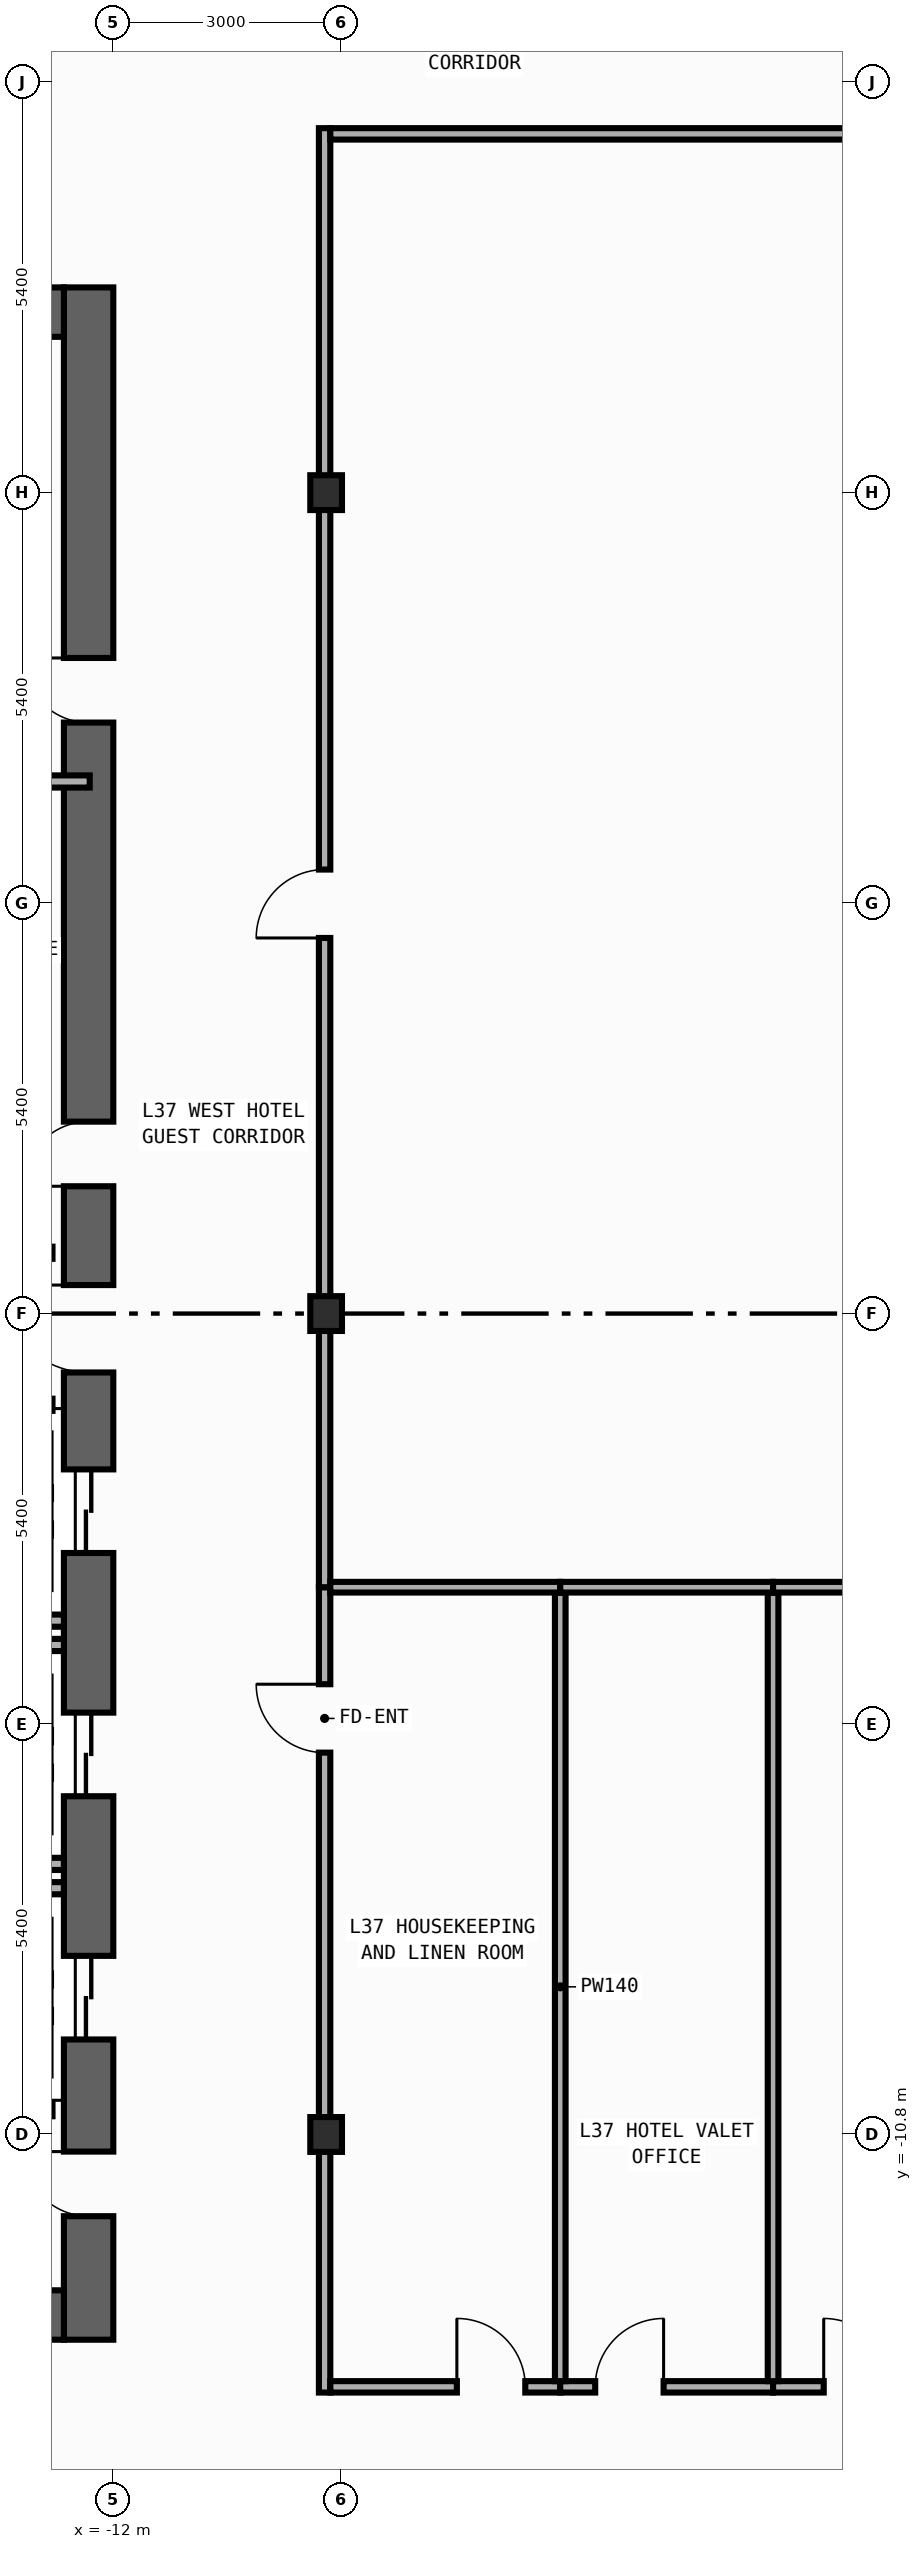
"""IFC4 building model, lengths in metres.
Left out: names, types, materials, properties, quantities, classifications, styles, units other than length and angle.
Written with IfcOpenShell. Run it as: python <this file> out.ifc"""

import sys

from ifc_helpers import new_model, si_unit, direction, frame, frame_2d, origin, origin_2d, place, context, subcontext, project, spatial, rectangle, i_section, extrude, element, fill, save


model = new_model("IFC4")
c1 = context("Model", 3, precision=1e-05, world=origin(), true_north=direction((0.0, 1.0)))
c2 = subcontext(c1, "Body", "Model", "MODEL_VIEW")
j1 = project(units=[si_unit("LENGTHUNIT", "METRE"), si_unit("PLANEANGLEUNIT", "RADIAN")], contexts=[c1])
p1 = place(None, origin())
s1 = spatial("IfcSite", under=j1, at=p1, CompositionType="ELEMENT")
p2 = place(p1, origin())
s2 = spatial("IfcBuilding", under=s1, at=p2, CompositionType="ELEMENT")
p3 = place(p2, frame((0.0, 0.0, 165.0)))
s3 = spatial("IfcBuildingStorey", under=s2, at=p3, CompositionType="ELEMENT", Elevation=165.0)
p4 = place(p3, frame((-12.325, -13.5, 0.0), z_axis=(0.0, 0.0, 1.0), x_axis=(0.0, 1.0, 0.0)))
e1 = element("IfcWall", 1, at=p4, inside=s3, PredefinedType="SHEAR", context=c2, shape_type="SweptSolid", body=[
    extrude(rectangle(XDim=27.0, YDim=0.65, at=frame_2d((13.5, 0.0))), origin(), (0.0, 0.0, 1.0), 3.54),
])
p5 = place(p4, frame((10.35, 0.0, 0.0)))
e2 = element("IfcOpeningElement", 2, at=p5, cuts=e1, PredefinedType="OPENING", context=c2, shape_type="SweptSolid", body=[
    extrude(rectangle(XDim=1.1, YDim=2.2, at=frame_2d((0.55, 1.1))), frame((0.0, 0.335, 0.0), z_axis=(0.0, -1.0, 0.0), x_axis=(1.0, 0.0, 0.0)), (0.0, 0.0, 1.0), 0.67),
])
p6 = place(p4, frame((7.15, 0.0, 0.0)))
e3 = element("IfcOpeningElement", 3, at=p6, cuts=e1, PredefinedType="OPENING", context=c2, shape_type="SweptSolid", body=[
    extrude(rectangle(XDim=1.1, YDim=2.2, at=frame_2d((0.55, 1.1))), frame((0.0, 0.335, 0.0), z_axis=(0.0, -1.0, 0.0), x_axis=(1.0, 0.0, 0.0)), (0.0, 0.0, 1.0), 0.67),
])
p7 = place(p4, frame((3.95, 0.0, 0.0)))
e4 = element("IfcOpeningElement", 4, at=p7, cuts=e1, PredefinedType="OPENING", context=c2, shape_type="SweptSolid", body=[
    extrude(rectangle(XDim=1.1, YDim=2.2, at=frame_2d((0.55, 1.1))), frame((0.0, 0.335, 0.0), z_axis=(0.0, -1.0, 0.0), x_axis=(1.0, 0.0, 0.0)), (0.0, 0.0, 1.0), 0.67),
])
p8 = place(p4, frame((15.175, 0.0, 0.0)))
e5 = element("IfcOpeningElement", 5, at=p8, cuts=e1, PredefinedType="OPENING", context=c2, shape_type="SweptSolid", body=[
    extrude(rectangle(XDim=0.85, YDim=2.1, at=frame_2d((0.425, 1.05))), frame((0.0, 0.335, 0.0), z_axis=(0.0, -1.0, 0.0), x_axis=(1.0, 0.0, 0.0)), (0.0, 0.0, 1.0), 0.67),
])
p9 = place(p4, frame((21.275, 0.0, 0.0)))
e6 = element("IfcOpeningElement", 6, at=p9, cuts=e1, PredefinedType="OPENING", context=c2, shape_type="SweptSolid", body=[
    extrude(rectangle(XDim=0.85, YDim=2.1, at=frame_2d((0.425, 1.05))), frame((0.0, 0.335, 0.0), z_axis=(0.0, -1.0, 0.0), x_axis=(1.0, 0.0, 0.0)), (0.0, 0.0, 1.0), 0.67),
])
p10 = place(p4, frame((12.725, 0.0, 0.0)))
e7 = element("IfcOpeningElement", 7, at=p10, cuts=e1, PredefinedType="OPENING", context=c2, shape_type="SweptSolid", body=[
    extrude(rectangle(XDim=1.15, YDim=2.2, at=frame_2d((0.575, 1.1))), frame((0.0, 0.335, 0.0), z_axis=(0.0, -1.0, 0.0), x_axis=(1.0, 0.0, 0.0)), (0.0, 0.0, 1.0), 0.67),
])
p11 = place(p4, frame((1.625, 0.0, 0.0)))
e8 = element("IfcOpeningElement", 8, at=p11, cuts=e1, PredefinedType="OPENING", context=c2, shape_type="SweptSolid", body=[
    extrude(rectangle(XDim=0.85, YDim=2.1, at=frame_2d((0.425, 1.05))), frame((0.0, 0.335, 0.0), z_axis=(0.0, -1.0, 0.0), x_axis=(1.0, 0.0, 0.0)), (0.0, 0.0, 1.0), 0.67),
])
for number, where, z_axis, x_axis in (
    (9, (-19.75, -13.175, 0.0), (0.0, 0.0, 1.0), (1.0, 0.0, 0.0)),
    (10, (-19.75, 13.175, 0.0), (0.0, 0.0, 1.0), (1.0, 0.0, 0.0)),
):
    element("IfcWall", number, at=place(p3, frame(where, z_axis=z_axis, x_axis=x_axis)), inside=s3, PredefinedType="SHEAR", context=c2, shape_type="SweptSolid", body=[
        extrude(rectangle(XDim=7.1, YDim=0.65, at=frame_2d((3.55, 0.0))), origin(), (0.0, 0.0, 1.0), 3.54),
    ])
for number, where, z_axis, x_axis in (
    (11, (-9.2, -10.8, 0.0), (0.0, 0.0, 1.0), (1.0, 0.0, 0.0)),
    (12, (-9.2, 0.0, 0.0), (0.0, 0.0, 1.0), (1.0, 0.0, 0.0)),
    (13, (-9.2, 10.8, 0.0), (0.0, 0.0, 1.0), (1.0, 0.0, 0.0)),
):
    element("IfcColumn", number, at=place(p3, frame(where, z_axis=z_axis, x_axis=x_axis)), inside=s3, PredefinedType="COLUMN", context=c2, shape_type="SweptSolid", body=[
        extrude(i_section(OverallWidth=0.417, OverallDepth=0.458, WebThickness=0.03, FlangeThickness=0.05, FilletRadius=0.022, at=origin_2d()), origin(), (0.0, 0.0, 1.0), 3.8),
    ])
for number, where, z_axis, x_axis in (
    (14, (-14.99, -4.04, 0.0), (0.0, 0.0, 1.0), (1.0, 0.0, 0.0)),
    (15, (-14.99, -7.24, 0.0), (0.0, 0.0, 1.0), (1.0, 0.0, 0.0)),
    (16, (-14.99, -4.36, 0.0), (0.0, 0.0, 1.0), (1.0, 0.0, 0.0)),
    (17, (-14.99, -7.56, 0.0), (0.0, 0.0, 1.0), (1.0, 0.0, 0.0)),
):
    element("IfcWall", number, at=place(p3, frame(where, z_axis=z_axis, x_axis=x_axis)), inside=s3, PredefinedType="STANDARD", context=c2, shape_type="SweptSolid", body=[
        extrude(rectangle(XDim=2.34, YDim=0.16, at=frame_2d((1.17, 0.0))), origin(), (0.0, 0.0, 1.0), 3.54),
    ])
p12 = place(p3, frame((-15.375, 7.0, 0.0), z_axis=(0.0, 0.0, 1.0), x_axis=(1.0, 0.0, 0.0)))
e18 = element("IfcWall", 18, at=p12, inside=s3, PredefinedType="PARTITIONING", context=c2, shape_type="SweptSolid", body=[
    extrude(rectangle(XDim=3.065, YDim=0.16, at=frame_2d((1.532, 0.0))), origin(), (0.0, 0.0, 1.0), 3.54),
])
p13 = place(p3, frame((-9.22, -14.195, 0.0), z_axis=(0.0, 0.0, 1.0), x_axis=(0.0, 1.0, 0.0)))
e19 = element("IfcWall", 19, at=p13, inside=s3, PredefinedType="PARTITIONING", context=c2, shape_type="SweptSolid", body=[
    extrude(rectangle(XDim=10.595, YDim=0.15, at=frame_2d((5.297, 0.0))), origin(), (0.0, 0.0, 1.0), 2.952),
])
p14 = place(p13, frame((8.419, 0.0, 0.0)))
e20 = element("IfcOpeningElement", 20, at=p14, cuts=e19, PredefinedType="OPENING", context=c2, shape_type="SweptSolid", body=[
    extrude(rectangle(XDim=0.9, YDim=2.15, at=frame_2d((0.45, 1.075))), frame((0.0, 0.085, 0.0), z_axis=(0.0, -1.0, 0.0), x_axis=(1.0, 0.0, 0.0)), (0.0, 0.0, 1.0), 0.17),
])
p15 = place(p3, frame((-9.22, -3.6, 0.0), z_axis=(0.0, 0.0, 1.0), x_axis=(0.0, 1.0, 0.0)))
e21 = element("IfcWall", 21, at=p15, inside=s3, PredefinedType="PARTITIONING", context=c2, shape_type="SweptSolid", body=[
    extrude(rectangle(XDim=19.195, YDim=0.15, at=frame_2d((9.598, 0.0))), origin(), (0.0, 0.0, 1.0), 2.952),
])
p16 = place(p15, frame((8.542, 0.0, 0.0)))
e22 = element("IfcOpeningElement", 22, at=p16, cuts=e21, PredefinedType="OPENING", context=c2, shape_type="SweptSolid", body=[
    extrude(rectangle(XDim=0.9, YDim=2.15, at=frame_2d((0.45, 1.075))), frame((0.0, 0.085, 0.0), z_axis=(0.0, -1.0, 0.0), x_axis=(1.0, 0.0, 0.0)), (0.0, 0.0, 1.0), 0.17),
])
p17 = place(p3, frame((-9.145, 15.52, 0.0), z_axis=(0.0, 0.0, 1.0), x_axis=(1.0, 0.0, 0.0)))
e23 = element("IfcWall", 23, at=p17, inside=s3, PredefinedType="PARTITIONING", context=c2, shape_type="SweptSolid", body=[
    extrude(rectangle(XDim=18.29, YDim=0.15, at=frame_2d((9.145, 0.0))), origin(), (0.0, 0.0, 1.0), 3.54),
])
p18 = place(p17, frame((15.725, 0.0, 0.0)))
e24 = element("IfcOpeningElement", 24, at=p18, cuts=e23, PredefinedType="OPENING", context=c2, shape_type="SweptSolid", body=[
    extrude(rectangle(XDim=0.9, YDim=2.15, at=frame_2d((0.45, 1.075))), frame((0.0, 0.085, 0.0), z_axis=(0.0, -1.0, 0.0), x_axis=(1.0, 0.0, 0.0)), (0.0, 0.0, 1.0), 0.17),
])
p19 = place(p3, frame((-9.145, -14.12, 0.0), z_axis=(0.0, 0.0, 1.0), x_axis=(1.0, 0.0, 0.0)))
e25 = element("IfcWall", 25, at=p19, inside=s3, PredefinedType="PARTITIONING", context=c2, shape_type="SweptSolid", body=[
    extrude(rectangle(XDim=3.025, YDim=0.15, at=frame_2d((1.512, 0.0))), origin(), (0.0, 0.0, 1.0), 3.54),
])
p20 = place(p19, frame((1.665, 0.0, 0.0)))
e26 = element("IfcOpeningElement", 26, at=p20, cuts=e25, PredefinedType="OPENING", context=c2, shape_type="SweptSolid", body=[
    extrude(rectangle(XDim=0.9, YDim=2.15, at=frame_2d((0.45, 1.075))), frame((0.0, 0.085, 0.0), z_axis=(0.0, -1.0, 0.0), x_axis=(1.0, 0.0, 0.0)), (0.0, 0.0, 1.0), 0.17),
])
p21 = place(p3, frame((-6.12, -14.12, 0.0), z_axis=(0.0, 0.0, 1.0), x_axis=(1.0, 0.0, 0.0)))
e27 = element("IfcWall", 27, at=p21, inside=s3, PredefinedType="PARTITIONING", context=c2, shape_type="SweptSolid", body=[
    extrude(rectangle(XDim=2.8, YDim=0.15, at=frame_2d((1.4, 0.0))), origin(), (0.0, 0.0, 1.0), 3.54),
])
p22 = place(p21, frame((0.46, 0.0, 0.0)))
e28 = element("IfcOpeningElement", 28, at=p22, cuts=e27, PredefinedType="OPENING", context=c2, shape_type="SweptSolid", body=[
    extrude(rectangle(XDim=0.9, YDim=2.15, at=frame_2d((0.45, 1.075))), frame((0.0, 0.085, 0.0), z_axis=(0.0, -1.0, 0.0), x_axis=(1.0, 0.0, 0.0)), (0.0, 0.0, 1.0), 0.17),
])
p23 = place(p3, frame((-3.32, -14.12, 0.0), z_axis=(0.0, 0.0, 1.0), x_axis=(1.0, 0.0, 0.0)))
e29 = element("IfcWall", 29, at=p23, inside=s3, PredefinedType="PARTITIONING", context=c2, shape_type="SweptSolid", body=[
    extrude(rectangle(XDim=7.6, YDim=0.15, at=frame_2d((3.8, 0.0))), origin(), (0.0, 0.0, 1.0), 3.54),
])
p24 = place(p23, frame((0.667, 0.0, 0.0)))
e30 = element("IfcOpeningElement", 30, at=p24, cuts=e29, PredefinedType="OPENING", context=c2, shape_type="SweptSolid", body=[
    extrude(rectangle(XDim=0.9, YDim=2.15, at=frame_2d((0.45, 1.075))), frame((0.0, 0.085, 0.0), z_axis=(0.0, -1.0, 0.0), x_axis=(1.0, 0.0, 0.0)), (0.0, 0.0, 1.0), 0.17),
])
p25 = place(p3, frame((-6.12, -14.045, 0.0), z_axis=(0.0, 0.0, 1.0), x_axis=(0.0, 1.0, 0.0)))
e31 = element("IfcWall", 31, at=p25, inside=s3, PredefinedType="PARTITIONING", context=c2, shape_type="SweptSolid", body=[
    extrude(rectangle(XDim=10.375, YDim=0.14, at=frame_2d((5.188, 0.0))), origin(), (0.0, 0.0, 1.0), 3.54),
])
p26 = place(p3, frame((-9.145, -3.6, 0.0), z_axis=(0.0, 0.0, 1.0), x_axis=(1.0, 0.0, 0.0)))
e32 = element("IfcWall", 32, at=p26, inside=s3, PredefinedType="PARTITIONING", context=c2, shape_type="SweptSolid", body=[
    extrude(rectangle(XDim=3.025, YDim=0.14, at=frame_2d((1.512, 0.0))), origin(), (0.0, 0.0, 1.0), 3.54),
])
p27 = place(p3, frame((-3.32, -14.045, 0.0), z_axis=(0.0, 0.0, 1.0), x_axis=(0.0, 1.0, 0.0)))
e33 = element("IfcWall", 33, at=p27, inside=s3, PredefinedType="PARTITIONING", context=c2, shape_type="SweptSolid", body=[
    extrude(rectangle(XDim=10.375, YDim=0.14, at=frame_2d((5.188, 0.0))), origin(), (0.0, 0.0, 1.0), 3.54),
])
p28 = place(p3, frame((-6.12, -3.6, 0.0), z_axis=(0.0, 0.0, 1.0), x_axis=(1.0, 0.0, 0.0)))
e34 = element("IfcWall", 34, at=p28, inside=s3, PredefinedType="PARTITIONING", context=c2, shape_type="SweptSolid", body=[
    extrude(rectangle(XDim=2.8, YDim=0.14, at=frame_2d((1.4, 0.0))), origin(), (0.0, 0.0, 1.0), 3.54),
])
p29 = place(p3, frame((-3.32, -3.6, 0.0), z_axis=(0.0, 0.0, 1.0), x_axis=(1.0, 0.0, 0.0)))
e35 = element("IfcWall", 35, at=p29, inside=s3, PredefinedType="PARTITIONING", context=c2, shape_type="SweptSolid", body=[
    extrude(rectangle(XDim=7.76, YDim=0.14, at=frame_2d((3.88, 0.0))), origin(), (0.0, 0.0, 1.0), 3.54),
])
p30 = place(p5, origin())
e36 = element("IfcDoor", 36, at=p30, inside=s3, OperationType="DOUBLE_DOOR_SLIDING", PredefinedType="DOOR", context=c2, shape_type="SweptSolid", body=[
    extrude(rectangle(XDim=1.1, YDim=2.2, at=frame_2d((0.55, 1.1))), frame((0.0, 0.025, 0.0), z_axis=(0.0, -1.0, 0.0), x_axis=(1.0, 0.0, 0.0)), (0.0, 0.0, 1.0), 0.05),
])
fill(e2, e36)
p31 = place(p6, origin())
e37 = element("IfcDoor", 37, at=p31, inside=s3, OperationType="DOUBLE_DOOR_SLIDING", PredefinedType="DOOR", context=c2, shape_type="SweptSolid", body=[
    extrude(rectangle(XDim=1.1, YDim=2.2, at=frame_2d((0.55, 1.1))), frame((0.0, 0.025, 0.0), z_axis=(0.0, -1.0, 0.0), x_axis=(1.0, 0.0, 0.0)), (0.0, 0.0, 1.0), 0.05),
])
fill(e3, e37)
p32 = place(p7, origin())
e38 = element("IfcDoor", 38, at=p32, inside=s3, OperationType="DOUBLE_DOOR_SLIDING", PredefinedType="DOOR", context=c2, shape_type="SweptSolid", body=[
    extrude(rectangle(XDim=1.1, YDim=2.2, at=frame_2d((0.55, 1.1))), frame((0.0, 0.025, 0.0), z_axis=(0.0, -1.0, 0.0), x_axis=(1.0, 0.0, 0.0)), (0.0, 0.0, 1.0), 0.05),
])
fill(e4, e38)
p33 = place(p8, origin())
e39 = element("IfcDoor", 39, at=p33, inside=s3, OperationType="SINGLE_SWING_LEFT", PredefinedType="DOOR", context=c2, shape_type="SweptSolid", body=[
    extrude(rectangle(XDim=0.85, YDim=2.1, at=frame_2d((0.425, 1.05))), frame((0.0, 0.025, 0.0), z_axis=(0.0, -1.0, 0.0), x_axis=(1.0, 0.0, 0.0)), (0.0, 0.0, 1.0), 0.05),
])
fill(e5, e39)
p34 = place(p9, origin())
e40 = element("IfcDoor", 40, at=p34, inside=s3, OperationType="SINGLE_SWING_RIGHT", PredefinedType="DOOR", context=c2, shape_type="SweptSolid", body=[
    extrude(rectangle(XDim=0.85, YDim=2.1, at=frame_2d((0.425, 1.05))), frame((0.0, 0.025, 0.0), z_axis=(0.0, -1.0, 0.0), x_axis=(1.0, 0.0, 0.0)), (0.0, 0.0, 1.0), 0.05),
])
fill(e6, e40)
p35 = place(p10, origin())
e41 = element("IfcDoor", 41, at=p35, inside=s3, OperationType="SINGLE_SWING_RIGHT", PredefinedType="DOOR", context=c2, shape_type="SweptSolid", body=[
    extrude(rectangle(XDim=1.15, YDim=2.2, at=frame_2d((0.575, 1.1))), frame((0.0, 0.025, 0.0), z_axis=(0.0, -1.0, 0.0), x_axis=(1.0, 0.0, 0.0)), (0.0, 0.0, 1.0), 0.05),
])
fill(e7, e41)
p36 = place(p11, origin())
e42 = element("IfcDoor", 42, at=p36, inside=s3, OperationType="SINGLE_SWING_RIGHT", PredefinedType="DOOR", context=c2, shape_type="SweptSolid", body=[
    extrude(rectangle(XDim=0.85, YDim=2.1, at=frame_2d((0.425, 1.05))), frame((0.0, 0.025, 0.0), z_axis=(0.0, -1.0, 0.0), x_axis=(1.0, 0.0, 0.0)), (0.0, 0.0, 1.0), 0.05),
])
fill(e8, e42)
p37 = place(p14, origin())
e43 = element("IfcDoor", 43, at=p37, inside=s3, OperationType="SINGLE_SWING_RIGHT", PredefinedType="DOOR", context=c2, shape_type="SweptSolid", body=[
    extrude(rectangle(XDim=0.9, YDim=2.15, at=frame_2d((0.45, 1.075))), frame((0.0, 0.025, 0.0), z_axis=(0.0, -1.0, 0.0), x_axis=(1.0, 0.0, 0.0)), (0.0, 0.0, 1.0), 0.05),
])
fill(e20, e43)
p38 = place(p16, origin())
e44 = element("IfcDoor", 44, at=p38, inside=s3, OperationType="SINGLE_SWING_LEFT", PredefinedType="DOOR", context=c2, shape_type="SweptSolid", body=[
    extrude(rectangle(XDim=0.9, YDim=2.15, at=frame_2d((0.45, 1.075))), frame((0.0, 0.025, 0.0), z_axis=(0.0, -1.0, 0.0), x_axis=(1.0, 0.0, 0.0)), (0.0, 0.0, 1.0), 0.05),
])
fill(e22, e44)
p39 = place(p20, origin())
e45 = element("IfcDoor", 45, at=p39, inside=s3, OperationType="SINGLE_SWING_LEFT", PredefinedType="DOOR", context=c2, shape_type="SweptSolid", body=[
    extrude(rectangle(XDim=0.9, YDim=2.15, at=frame_2d((0.45, 1.075))), frame((0.0, 0.025, 0.0), z_axis=(0.0, -1.0, 0.0), x_axis=(1.0, 0.0, 0.0)), (0.0, 0.0, 1.0), 0.05),
])
fill(e26, e45)
p40 = place(p22, origin())
e46 = element("IfcDoor", 46, at=p40, inside=s3, OperationType="SINGLE_SWING_RIGHT", PredefinedType="DOOR", context=c2, shape_type="SweptSolid", body=[
    extrude(rectangle(XDim=0.9, YDim=2.15, at=frame_2d((0.45, 1.075))), frame((0.0, 0.025, 0.0), z_axis=(0.0, -1.0, 0.0), x_axis=(1.0, 0.0, 0.0)), (0.0, 0.0, 1.0), 0.05),
])
fill(e28, e46)
p41 = place(p24, origin())
e47 = element("IfcDoor", 47, at=p41, inside=s3, OperationType="SINGLE_SWING_LEFT", PredefinedType="DOOR", context=c2, shape_type="SweptSolid", body=[
    extrude(rectangle(XDim=0.9, YDim=2.15, at=frame_2d((0.45, 1.075))), frame((0.0, 0.025, 0.0), z_axis=(0.0, -1.0, 0.0), x_axis=(1.0, 0.0, 0.0)), (0.0, 0.0, 1.0), 0.05),
])
fill(e30, e47)
save(model, sys.argv[1])
